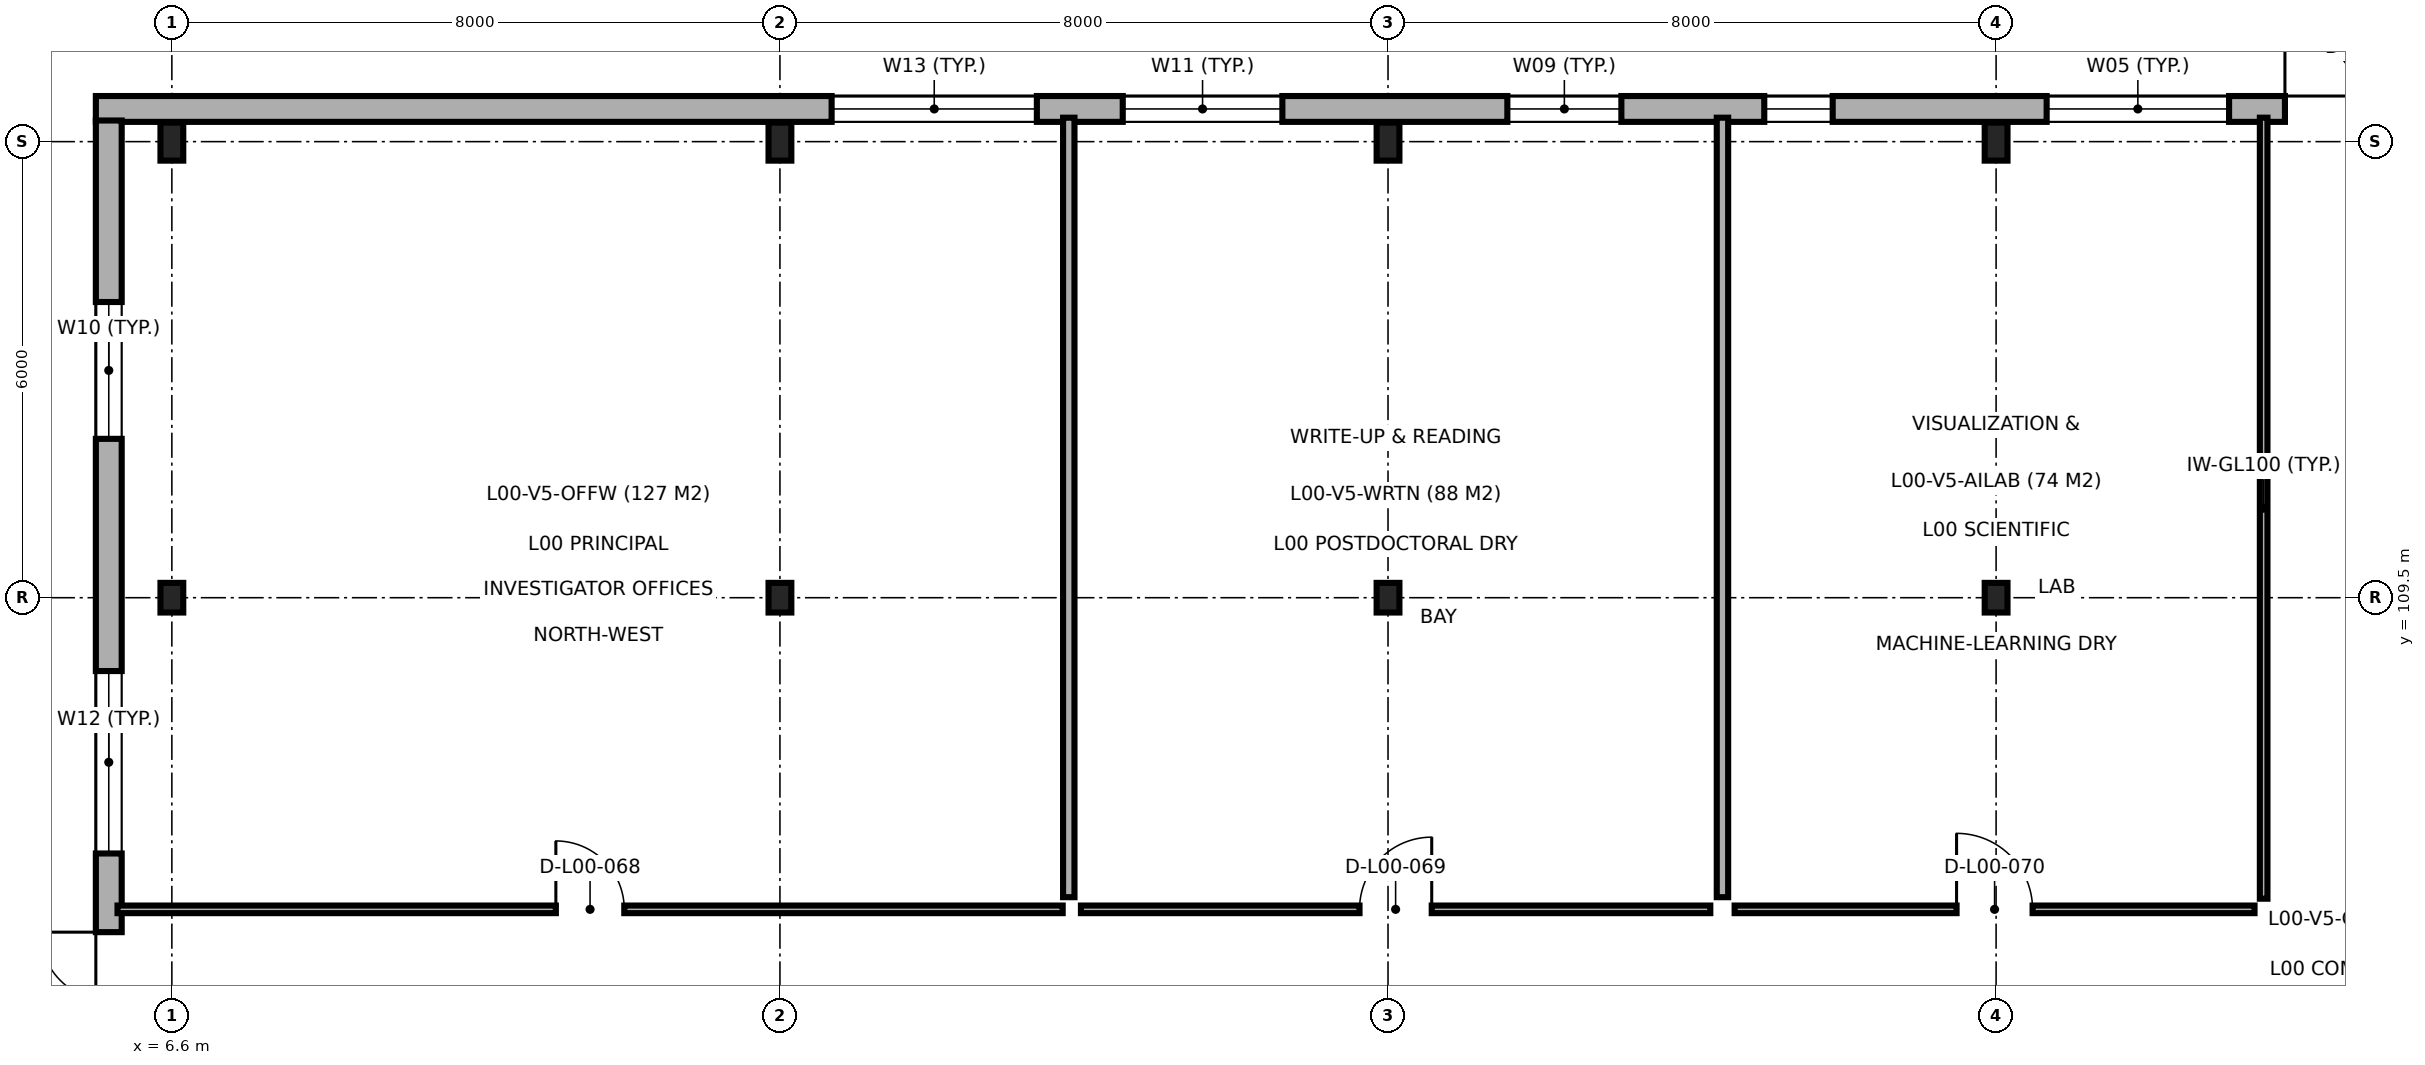
"""IFC4 building model, lengths in metres.
Left out: names, types, materials, properties, quantities, classifications, styles, units other than length and angle.
Written with IfcOpenShell. Run it as: python <this file> out.ifc"""

import sys

from ifc_helpers import new_model, si_unit, direction, frame, frame_2d, origin, origin_2d, place, context, subcontext, project, spatial, rectangle, i_section, extrude, element, fill, save


model = new_model("IFC4")
c1 = context("Model", 3, precision=1e-05, world=origin(), true_north=direction((0.0, 1.0)))
c2 = subcontext(c1, "Body", "Model", "MODEL_VIEW")
j1 = project(units=[si_unit("LENGTHUNIT", "METRE"), si_unit("PLANEANGLEUNIT", "RADIAN")], contexts=[c1])
p1 = place(None, origin())
s1 = spatial("IfcSite", under=j1, at=p1, CompositionType="ELEMENT")
p2 = place(p1, origin())
s2 = spatial("IfcBuilding", under=s1, at=p2, CompositionType="ELEMENT")
p3 = place(p2, origin())
s3 = spatial("IfcBuildingStorey", under=s2, at=p3, CompositionType="ELEMENT", Elevation=0.0)
p4 = place(p3, frame((6.6, 109.5, 0.0), z_axis=(0.0, 0.0, 1.0), x_axis=(1.0, 0.0, 0.0)))
e1 = element("IfcColumn", 1, at=p4, inside=s3, PredefinedType="COLUMN", context=c2, shape_type="SweptSolid", body=[
    extrude(i_section(OverallWidth=0.3, OverallDepth=0.39, WebThickness=0.011, FlangeThickness=0.019, FilletRadius=0.027, at=origin_2d()), origin(), (0.0, 0.0, 1.0), 4.8),
])
p5 = place(p3, frame((6.6, 115.5, 0.0), z_axis=(0.0, 0.0, 1.0), x_axis=(1.0, 0.0, 0.0)))
e2 = element("IfcColumn", 2, at=p5, inside=s3, PredefinedType="COLUMN", context=c2, shape_type="SweptSolid", body=[
    extrude(i_section(OverallWidth=0.3, OverallDepth=0.5, WebThickness=0.014, FlangeThickness=0.028, FilletRadius=0.027, at=origin_2d()), origin(), (0.0, 0.0, 1.0), 4.8),
])
p6 = place(p3, frame((14.6, 109.5, 0.0), z_axis=(0.0, 0.0, 1.0), x_axis=(1.0, 0.0, 0.0)))
e3 = element("IfcColumn", 3, at=p6, inside=s3, PredefinedType="COLUMN", context=c2, shape_type="SweptSolid", body=[
    extrude(i_section(OverallWidth=0.3, OverallDepth=0.39, WebThickness=0.011, FlangeThickness=0.019, FilletRadius=0.027, at=origin_2d()), origin(), (0.0, 0.0, 1.0), 4.8),
])
p7 = place(p3, frame((14.6, 115.5, 0.0), z_axis=(0.0, 0.0, 1.0), x_axis=(1.0, 0.0, 0.0)))
e4 = element("IfcColumn", 4, at=p7, inside=s3, PredefinedType="COLUMN", context=c2, shape_type="SweptSolid", body=[
    extrude(i_section(OverallWidth=0.3, OverallDepth=0.5, WebThickness=0.014, FlangeThickness=0.028, FilletRadius=0.027, at=origin_2d()), origin(), (0.0, 0.0, 1.0), 4.8),
])
p8 = place(p3, frame((22.6, 109.5, 0.0), z_axis=(0.0, 0.0, 1.0), x_axis=(1.0, 0.0, 0.0)))
e5 = element("IfcColumn", 5, at=p8, inside=s3, PredefinedType="COLUMN", context=c2, shape_type="SweptSolid", body=[
    extrude(i_section(OverallWidth=0.3, OverallDepth=0.39, WebThickness=0.011, FlangeThickness=0.019, FilletRadius=0.027, at=origin_2d()), origin(), (0.0, 0.0, 1.0), 4.8),
])
p9 = place(p3, frame((22.6, 115.5, 0.0), z_axis=(0.0, 0.0, 1.0), x_axis=(1.0, 0.0, 0.0)))
e6 = element("IfcColumn", 6, at=p9, inside=s3, PredefinedType="COLUMN", context=c2, shape_type="SweptSolid", body=[
    extrude(i_section(OverallWidth=0.3, OverallDepth=0.5, WebThickness=0.014, FlangeThickness=0.028, FilletRadius=0.027, at=origin_2d()), origin(), (0.0, 0.0, 1.0), 4.8),
])
p10 = place(p3, frame((30.6, 109.5, 0.0), z_axis=(0.0, 0.0, 1.0), x_axis=(1.0, 0.0, 0.0)))
e7 = element("IfcColumn", 7, at=p10, inside=s3, PredefinedType="COLUMN", context=c2, shape_type="SweptSolid", body=[
    extrude(i_section(OverallWidth=0.3, OverallDepth=0.39, WebThickness=0.011, FlangeThickness=0.019, FilletRadius=0.027, at=origin_2d()), origin(), (0.0, 0.0, 1.0), 4.8),
])
p11 = place(p3, frame((30.6, 115.5, 0.0), z_axis=(0.0, 0.0, 1.0), x_axis=(1.0, 0.0, 0.0)))
e8 = element("IfcColumn", 8, at=p11, inside=s3, PredefinedType="COLUMN", context=c2, shape_type="SweptSolid", body=[
    extrude(i_section(OverallWidth=0.3, OverallDepth=0.5, WebThickness=0.014, FlangeThickness=0.028, FilletRadius=0.027, at=origin_2d()), origin(), (0.0, 0.0, 1.0), 4.8),
])
p12 = place(p3, frame((47.078, 115.93, 0.0), z_axis=(0.0, 0.0, 1.0), x_axis=(-1.0, 0.0, 0.0)))
e9 = element("IfcWall", 9, at=p12, inside=s3, PredefinedType="SOLIDWALL", context=c2, shape_type="SweptSolid", body=[
    extrude(rectangle(XDim=41.478, YDim=0.34, at=frame_2d((20.739, 0.0))), origin(), (0.0, 0.0, 1.0), 4.55),
])
p13 = place(p12, frame((10.678, 0.0, 0.0)))
e10 = element("IfcOpeningElement", 10, at=p13, cuts=e9, PredefinedType="OPENING", context=c2, shape_type="SweptSolid", body=[
    extrude(rectangle(XDim=2.0, YDim=2.4, at=frame_2d((1.0, 1.2))), frame((0.0, 0.18, 0.0), z_axis=(0.0, -1.0, 0.0), x_axis=(1.0, 0.0, 0.0)), (0.0, 0.0, 1.0), 0.36),
])
p14 = place(p12, frame((9.103, 0.0, 0.9)))
e11 = element("IfcOpeningElement", 11, at=p14, cuts=e9, PredefinedType="OPENING", context=c2, shape_type="SweptSolid", body=[
    extrude(rectangle(XDim=0.9, YDim=1.8, at=frame_2d((0.45, 0.9))), frame((0.0, 0.18, 0.0), z_axis=(0.0, -1.0, 0.0), x_axis=(1.0, 0.0, 0.0)), (0.0, 0.0, 1.0), 0.36),
])
p15 = place(p12, frame((13.413, 0.0, 0.9)))
e12 = element("IfcOpeningElement", 12, at=p15, cuts=e9, PredefinedType="OPENING", context=c2, shape_type="SweptSolid", body=[
    extrude(rectangle(XDim=2.4, YDim=1.8, at=frame_2d((1.2, 0.9))), frame((0.0, 0.18, 0.0), z_axis=(0.0, -1.0, 0.0), x_axis=(1.0, 0.0, 0.0)), (0.0, 0.0, 1.0), 0.36),
])
p16 = place(p12, frame((18.628, 0.0, 0.9)))
e13 = element("IfcOpeningElement", 13, at=p16, cuts=e9, PredefinedType="OPENING", context=c2, shape_type="SweptSolid", body=[
    extrude(rectangle(XDim=0.9, YDim=1.8, at=frame_2d((0.45, 0.9))), frame((0.0, 0.18, 0.0), z_axis=(0.0, -1.0, 0.0), x_axis=(1.0, 0.0, 0.0)), (0.0, 0.0, 1.0), 0.36),
])
p17 = place(p12, frame((21.408, 0.0, 0.9)))
e14 = element("IfcOpeningElement", 14, at=p17, cuts=e9, PredefinedType="OPENING", context=c2, shape_type="SweptSolid", body=[
    extrude(rectangle(XDim=1.5, YDim=2.1, at=frame_2d((0.75, 1.05))), frame((0.0, 0.18, 0.0), z_axis=(0.0, -1.0, 0.0), x_axis=(1.0, 0.0, 0.0)), (0.0, 0.0, 1.0), 0.36),
])
p18 = place(p12, frame((25.868, 0.0, 0.9)))
e15 = element("IfcOpeningElement", 15, at=p18, cuts=e9, PredefinedType="OPENING", context=c2, shape_type="SweptSolid", body=[
    extrude(rectangle(XDim=2.1, YDim=2.1, at=frame_2d((1.05, 1.05))), frame((0.0, 0.18, 0.0), z_axis=(0.0, -1.0, 0.0), x_axis=(1.0, 0.0, 0.0)), (0.0, 0.0, 1.0), 0.36),
])
p19 = place(p12, frame((29.098, 0.0, 0.9)))
e16 = element("IfcOpeningElement", 16, at=p19, cuts=e9, PredefinedType="OPENING", context=c2, shape_type="SweptSolid", body=[
    extrude(rectangle(XDim=2.7, YDim=2.1, at=frame_2d((1.35, 1.05))), frame((0.0, 0.18, 0.0), z_axis=(0.0, -1.0, 0.0), x_axis=(1.0, 0.0, 0.0)), (0.0, 0.0, 1.0), 0.36),
])
p20 = place(p3, frame((5.77, 115.778, 0.0), z_axis=(0.0, 0.0, 1.0), x_axis=(0.0, -1.0, 0.0)))
e17 = element("IfcWall", 17, at=p20, inside=s3, PredefinedType="SOLIDWALL", context=c2, shape_type="SweptSolid", body=[
    extrude(rectangle(XDim=30.878, YDim=0.34, at=frame_2d((15.439, 0.0))), origin(), (0.0, 0.0, 1.0), 4.55),
])
p21 = place(p20, frame((10.678, 0.0, 0.0)))
e18 = element("IfcOpeningElement", 18, at=p21, cuts=e17, PredefinedType="OPENING", context=c2, shape_type="SweptSolid", body=[
    extrude(rectangle(XDim=1.8, YDim=2.3, at=frame_2d((0.9, 1.15))), frame((0.0, 0.18, 0.0), z_axis=(0.0, -1.0, 0.0), x_axis=(1.0, 0.0, 0.0)), (0.0, 0.0, 1.0), 0.36),
])
p22 = place(p20, frame((2.388, 0.0, 0.9)))
e19 = element("IfcOpeningElement", 19, at=p22, cuts=e17, PredefinedType="OPENING", context=c2, shape_type="SweptSolid", body=[
    extrude(rectangle(XDim=1.8, YDim=2.1, at=frame_2d((0.9, 1.05))), frame((0.0, 0.18, 0.0), z_axis=(0.0, -1.0, 0.0), x_axis=(1.0, 0.0, 0.0)), (0.0, 0.0, 1.0), 0.36),
])
p23 = place(p20, frame((7.243, 0.0, 0.9)))
e20 = element("IfcOpeningElement", 20, at=p23, cuts=e17, PredefinedType="OPENING", context=c2, shape_type="SweptSolid", body=[
    extrude(rectangle(XDim=2.4, YDim=2.1, at=frame_2d((1.2, 1.05))), frame((0.0, 0.18, 0.0), z_axis=(0.0, -1.0, 0.0), x_axis=(1.0, 0.0, 0.0)), (0.0, 0.0, 1.0), 0.36),
])
p24 = place(p20, frame((14.998, 0.0, 0.9)))
e21 = element("IfcOpeningElement", 21, at=p24, cuts=e17, PredefinedType="OPENING", context=c2, shape_type="SweptSolid", body=[
    extrude(rectangle(XDim=0.9, YDim=1.8, at=frame_2d((0.45, 0.9))), frame((0.0, 0.18, 0.0), z_axis=(0.0, -1.0, 0.0), x_axis=(1.0, 0.0, 0.0)), (0.0, 0.0, 1.0), 0.36),
])
p25 = place(p20, frame((18.458, 0.0, 0.9)))
e22 = element("IfcOpeningElement", 22, at=p25, cuts=e17, PredefinedType="OPENING", context=c2, shape_type="SweptSolid", body=[
    extrude(rectangle(XDim=1.5, YDim=1.5, at=frame_2d((0.75, 0.75))), frame((0.0, 0.18, 0.0), z_axis=(0.0, -1.0, 0.0), x_axis=(1.0, 0.0, 0.0)), (0.0, 0.0, 1.0), 0.36),
])
p26 = place(p20, frame((24.348, 0.0, 0.9)))
e23 = element("IfcOpeningElement", 23, at=p26, cuts=e17, PredefinedType="OPENING", context=c2, shape_type="SweptSolid", body=[
    extrude(rectangle(XDim=2.4, YDim=1.5, at=frame_2d((1.2, 0.75))), frame((0.0, 0.18, 0.0), z_axis=(0.0, -1.0, 0.0), x_axis=(1.0, 0.0, 0.0)), (0.0, 0.0, 1.0), 0.36),
])
for number, where, z_axis, x_axis in (
    (24, (18.4, 105.56, 0.0), (0.0, 0.0, 1.0), (0.0, 1.0, 0.0)),
    (25, (27.0, 105.56, 0.0), (0.0, 0.0, 1.0), (0.0, 1.0, 0.0)),
):
    element("IfcWall", number, at=place(p3, frame(where, z_axis=z_axis, x_axis=x_axis)), inside=s3, PredefinedType="PARTITIONING", context=c2, shape_type="SweptSolid", body=[
        extrude(rectangle(XDim=10.255, YDim=0.15, at=frame_2d((5.127, 0.0))), origin(), (0.0, 0.0, 1.0), 4.55),
    ])
p27 = place(p3, frame((34.12, 105.54, 0.0), z_axis=(0.0, 0.0, 1.0), x_axis=(0.0, 1.0, 0.0)))
e26 = element("IfcWall", 26, at=p27, inside=s3, PredefinedType="PARTITIONING", context=c2, shape_type="SweptSolid", body=[
    extrude(rectangle(XDim=10.275, YDim=0.1, at=frame_2d((5.137, 0.0))), origin(), (0.0, 0.0, 1.0), 4.55),
])
p28 = place(p3, frame((5.885, 105.4, 0.0), z_axis=(0.0, 0.0, 1.0), x_axis=(1.0, 0.0, 0.0)))
e27 = element("IfcWall", 27, at=p28, inside=s3, PredefinedType="PARTITIONING", context=c2, shape_type="SweptSolid", body=[
    extrude(rectangle(XDim=12.435, YDim=0.1, at=frame_2d((6.218, 0.0))), origin(), (0.0, 0.0, 1.0), 4.55),
])
p29 = place(p28, frame((5.767, 0.0, 0.0)))
e28 = element("IfcOpeningElement", 28, at=p29, cuts=e27, PredefinedType="OPENING", context=c2, shape_type="SweptSolid", body=[
    extrude(rectangle(XDim=0.9, YDim=2.1, at=frame_2d((0.45, 1.05))), frame((0.0, 0.06, 0.0), z_axis=(0.0, -1.0, 0.0), x_axis=(1.0, 0.0, 0.0)), (0.0, 0.0, 1.0), 0.12),
])
p30 = place(p3, frame((18.56, 105.4, 0.0), z_axis=(0.0, 0.0, 1.0), x_axis=(1.0, 0.0, 0.0)))
e29 = element("IfcWall", 29, at=p30, inside=s3, PredefinedType="PARTITIONING", context=c2, shape_type="SweptSolid", body=[
    extrude(rectangle(XDim=8.28, YDim=0.1, at=frame_2d((4.14, 0.0))), origin(), (0.0, 0.0, 1.0), 4.55),
])
p31 = place(p30, frame((3.665, 0.0, 0.0)))
e30 = element("IfcOpeningElement", 30, at=p31, cuts=e29, PredefinedType="OPENING", context=c2, shape_type="SweptSolid", body=[
    extrude(rectangle(XDim=0.95, YDim=2.1, at=frame_2d((0.475, 1.05))), frame((0.0, 0.06, 0.0), z_axis=(0.0, -1.0, 0.0), x_axis=(1.0, 0.0, 0.0)), (0.0, 0.0, 1.0), 0.12),
])
p32 = place(p3, frame((27.16, 105.4, 0.0), z_axis=(0.0, 0.0, 1.0), x_axis=(1.0, 0.0, 0.0)))
e31 = element("IfcWall", 31, at=p32, inside=s3, PredefinedType="PARTITIONING", context=c2, shape_type="SweptSolid", body=[
    extrude(rectangle(XDim=6.84, YDim=0.1, at=frame_2d((3.42, 0.0))), origin(), (0.0, 0.0, 1.0), 4.55),
])
p33 = place(p32, frame((2.92, 0.0, 0.0)))
e32 = element("IfcOpeningElement", 32, at=p33, cuts=e31, PredefinedType="OPENING", context=c2, shape_type="SweptSolid", body=[
    extrude(rectangle(XDim=1.0, YDim=2.15, at=frame_2d((0.5, 1.075))), frame((0.0, 0.06, 0.0), z_axis=(0.0, -1.0, 0.0), x_axis=(1.0, 0.0, 0.0)), (0.0, 0.0, 1.0), 0.12),
])
p34 = place(p13, frame((2.0, 0.0, 0.0), z_axis=(0.0, 0.0, 1.0), x_axis=(-1.0, 0.0, 0.0)))
e33 = element("IfcDoor", 33, at=p34, inside=s3, OperationType="DOUBLE_DOOR_SINGLE_SWING", PredefinedType="DOOR", context=c2, shape_type="SweptSolid", body=[
    extrude(rectangle(XDim=2.0, YDim=2.4, at=frame_2d((1.0, 1.2))), frame((0.0, 0.025, 0.0), z_axis=(0.0, -1.0, 0.0), x_axis=(1.0, 0.0, 0.0)), (0.0, 0.0, 1.0), 0.05),
])
fill(e10, e33)
p35 = place(p15, origin())
e34 = element("IfcWindow", 34, at=p35, inside=s3, PartitioningType="SINGLE_PANEL", PredefinedType="WINDOW", context=c2, shape_type="SweptSolid", body=[
    extrude(rectangle(XDim=2.4, YDim=1.8, at=frame_2d((1.2, 0.9))), frame((0.0, 0.03, 0.0), z_axis=(0.0, -1.0, 0.0), x_axis=(1.0, 0.0, 0.0)), (0.0, 0.0, 1.0), 0.06),
])
fill(e12, e34)
p36 = place(p16, origin())
e35 = element("IfcWindow", 35, at=p36, inside=s3, PartitioningType="SINGLE_PANEL", PredefinedType="WINDOW", context=c2, shape_type="SweptSolid", body=[
    extrude(rectangle(XDim=0.9, YDim=1.8, at=frame_2d((0.45, 0.9))), frame((0.0, 0.03, 0.0), z_axis=(0.0, -1.0, 0.0), x_axis=(1.0, 0.0, 0.0)), (0.0, 0.0, 1.0), 0.06),
])
fill(e13, e35)
p37 = place(p17, origin())
e36 = element("IfcWindow", 36, at=p37, inside=s3, PartitioningType="SINGLE_PANEL", PredefinedType="WINDOW", context=c2, shape_type="SweptSolid", body=[
    extrude(rectangle(XDim=1.5, YDim=2.1, at=frame_2d((0.75, 1.05))), frame((0.0, 0.03, 0.0), z_axis=(0.0, -1.0, 0.0), x_axis=(1.0, 0.0, 0.0)), (0.0, 0.0, 1.0), 0.06),
])
fill(e14, e36)
p38 = place(p18, origin())
e37 = element("IfcWindow", 37, at=p38, inside=s3, PartitioningType="SINGLE_PANEL", PredefinedType="WINDOW", context=c2, shape_type="SweptSolid", body=[
    extrude(rectangle(XDim=2.1, YDim=2.1, at=frame_2d((1.05, 1.05))), frame((0.0, 0.03, 0.0), z_axis=(0.0, -1.0, 0.0), x_axis=(1.0, 0.0, 0.0)), (0.0, 0.0, 1.0), 0.06),
])
fill(e15, e37)
p39 = place(p19, origin())
e38 = element("IfcWindow", 38, at=p39, inside=s3, PartitioningType="SINGLE_PANEL", PredefinedType="WINDOW", context=c2, shape_type="SweptSolid", body=[
    extrude(rectangle(XDim=2.7, YDim=2.1, at=frame_2d((1.35, 1.05))), frame((0.0, 0.03, 0.0), z_axis=(0.0, -1.0, 0.0), x_axis=(1.0, 0.0, 0.0)), (0.0, 0.0, 1.0), 0.06),
])
fill(e16, e38)
p40 = place(p21, frame((1.8, 0.0, 0.0), z_axis=(0.0, 0.0, 1.0), x_axis=(-1.0, 0.0, 0.0)))
e39 = element("IfcDoor", 39, at=p40, inside=s3, OperationType="DOUBLE_DOOR_SINGLE_SWING", PredefinedType="DOOR", context=c2, shape_type="SweptSolid", body=[
    extrude(rectangle(XDim=1.8, YDim=2.3, at=frame_2d((0.9, 1.15))), frame((0.0, 0.025, 0.0), z_axis=(0.0, -1.0, 0.0), x_axis=(1.0, 0.0, 0.0)), (0.0, 0.0, 1.0), 0.05),
])
fill(e18, e39)
p41 = place(p22, origin())
e40 = element("IfcWindow", 40, at=p41, inside=s3, PartitioningType="SINGLE_PANEL", PredefinedType="WINDOW", context=c2, shape_type="SweptSolid", body=[
    extrude(rectangle(XDim=1.8, YDim=2.1, at=frame_2d((0.9, 1.05))), frame((0.0, 0.03, 0.0), z_axis=(0.0, -1.0, 0.0), x_axis=(1.0, 0.0, 0.0)), (0.0, 0.0, 1.0), 0.06),
])
fill(e19, e40)
p42 = place(p23, origin())
e41 = element("IfcWindow", 41, at=p42, inside=s3, PartitioningType="SINGLE_PANEL", PredefinedType="WINDOW", context=c2, shape_type="SweptSolid", body=[
    extrude(rectangle(XDim=2.4, YDim=2.1, at=frame_2d((1.2, 1.05))), frame((0.0, 0.03, 0.0), z_axis=(0.0, -1.0, 0.0), x_axis=(1.0, 0.0, 0.0)), (0.0, 0.0, 1.0), 0.06),
])
fill(e20, e41)
p43 = place(p29, origin())
e42 = element("IfcDoor", 42, at=p43, inside=s3, OperationType="SINGLE_SWING_LEFT", PredefinedType="DOOR", context=c2, shape_type="SweptSolid", body=[
    extrude(rectangle(XDim=0.9, YDim=2.1, at=frame_2d((0.45, 1.05))), frame((0.0, 0.025, 0.0), z_axis=(0.0, -1.0, 0.0), x_axis=(1.0, 0.0, 0.0)), (0.0, 0.0, 1.0), 0.05),
])
fill(e28, e42)
p44 = place(p31, origin())
e43 = element("IfcDoor", 43, at=p44, inside=s3, OperationType="SINGLE_SWING_RIGHT", PredefinedType="DOOR", context=c2, shape_type="SweptSolid", body=[
    extrude(rectangle(XDim=0.95, YDim=2.1, at=frame_2d((0.475, 1.05))), frame((0.0, 0.025, 0.0), z_axis=(0.0, -1.0, 0.0), x_axis=(1.0, 0.0, 0.0)), (0.0, 0.0, 1.0), 0.05),
])
fill(e30, e43)
p45 = place(p33, origin())
e44 = element("IfcDoor", 44, at=p45, inside=s3, OperationType="SINGLE_SWING_LEFT", PredefinedType="DOOR", context=c2, shape_type="SweptSolid", body=[
    extrude(rectangle(XDim=1.0, YDim=2.15, at=frame_2d((0.5, 1.075))), frame((0.0, 0.025, 0.0), z_axis=(0.0, -1.0, 0.0), x_axis=(1.0, 0.0, 0.0)), (0.0, 0.0, 1.0), 0.05),
])
fill(e32, e44)
save(model, sys.argv[1])
